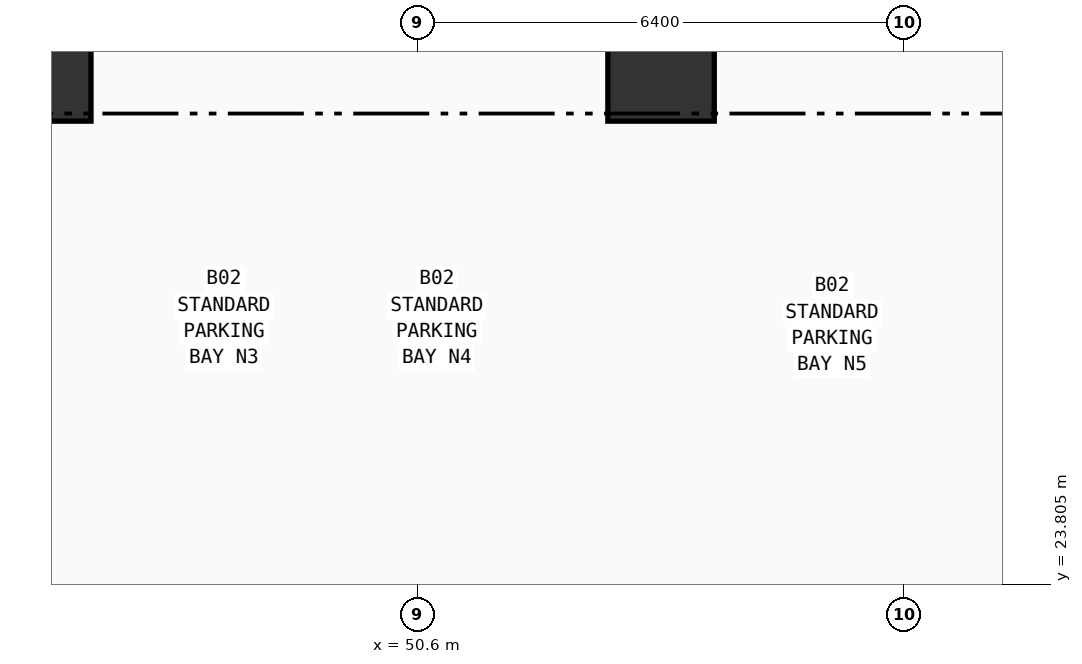
"""IFC4 building model, lengths in metres.
Left out: names, types, materials, properties, quantities, classifications, styles, units other than length and angle.
Written with IfcOpenShell. Run it as: python <this file> out.ifc"""

import sys

from ifc_helpers import new_model, si_unit, direction, frame, origin, origin_2d, place, context, subcontext, project, spatial, rectangle, extrude, element, save


model = new_model("IFC4")
c1 = context("Model", 3, precision=1e-05, world=origin(), true_north=direction((0.0, 1.0)))
c2 = subcontext(c1, "Body", "Model", "MODEL_VIEW")
j1 = project(units=[si_unit("LENGTHUNIT", "METRE"), si_unit("PLANEANGLEUNIT", "RADIAN")], contexts=[c1])
p1 = place(None, origin())
s1 = spatial("IfcSite", under=j1, at=p1, CompositionType="ELEMENT")
p2 = place(p1, origin())
s2 = spatial("IfcBuilding", under=s1, at=p2, CompositionType="ELEMENT")
p3 = place(p2, frame((0.0, 0.0, -8.4)))
s3 = spatial("IfcBuildingStorey", under=s2, at=p3, CompositionType="ELEMENT", Elevation=-8.4)
for number, where, z_axis, x_axis in (
    (1, (45.6, 30.6, 0.0), (0.0, 0.0, 1.0), (1.0, 0.0, 0.0)),
    (2, (53.8, 30.6, 0.0), (0.0, 0.0, 1.0), (1.0, 0.0, 0.0)),
):
    element("IfcColumn", number, at=place(p3, frame(where, z_axis=z_axis, x_axis=x_axis)), inside=s3, PredefinedType="COLUMN", context=c2, shape_type="SweptSolid", body=[
        extrude(rectangle(XDim=1.4, YDim=1.4, at=origin_2d()), origin(), (0.0, 0.0, 1.0), 3.86),
    ])
save(model, sys.argv[1])
